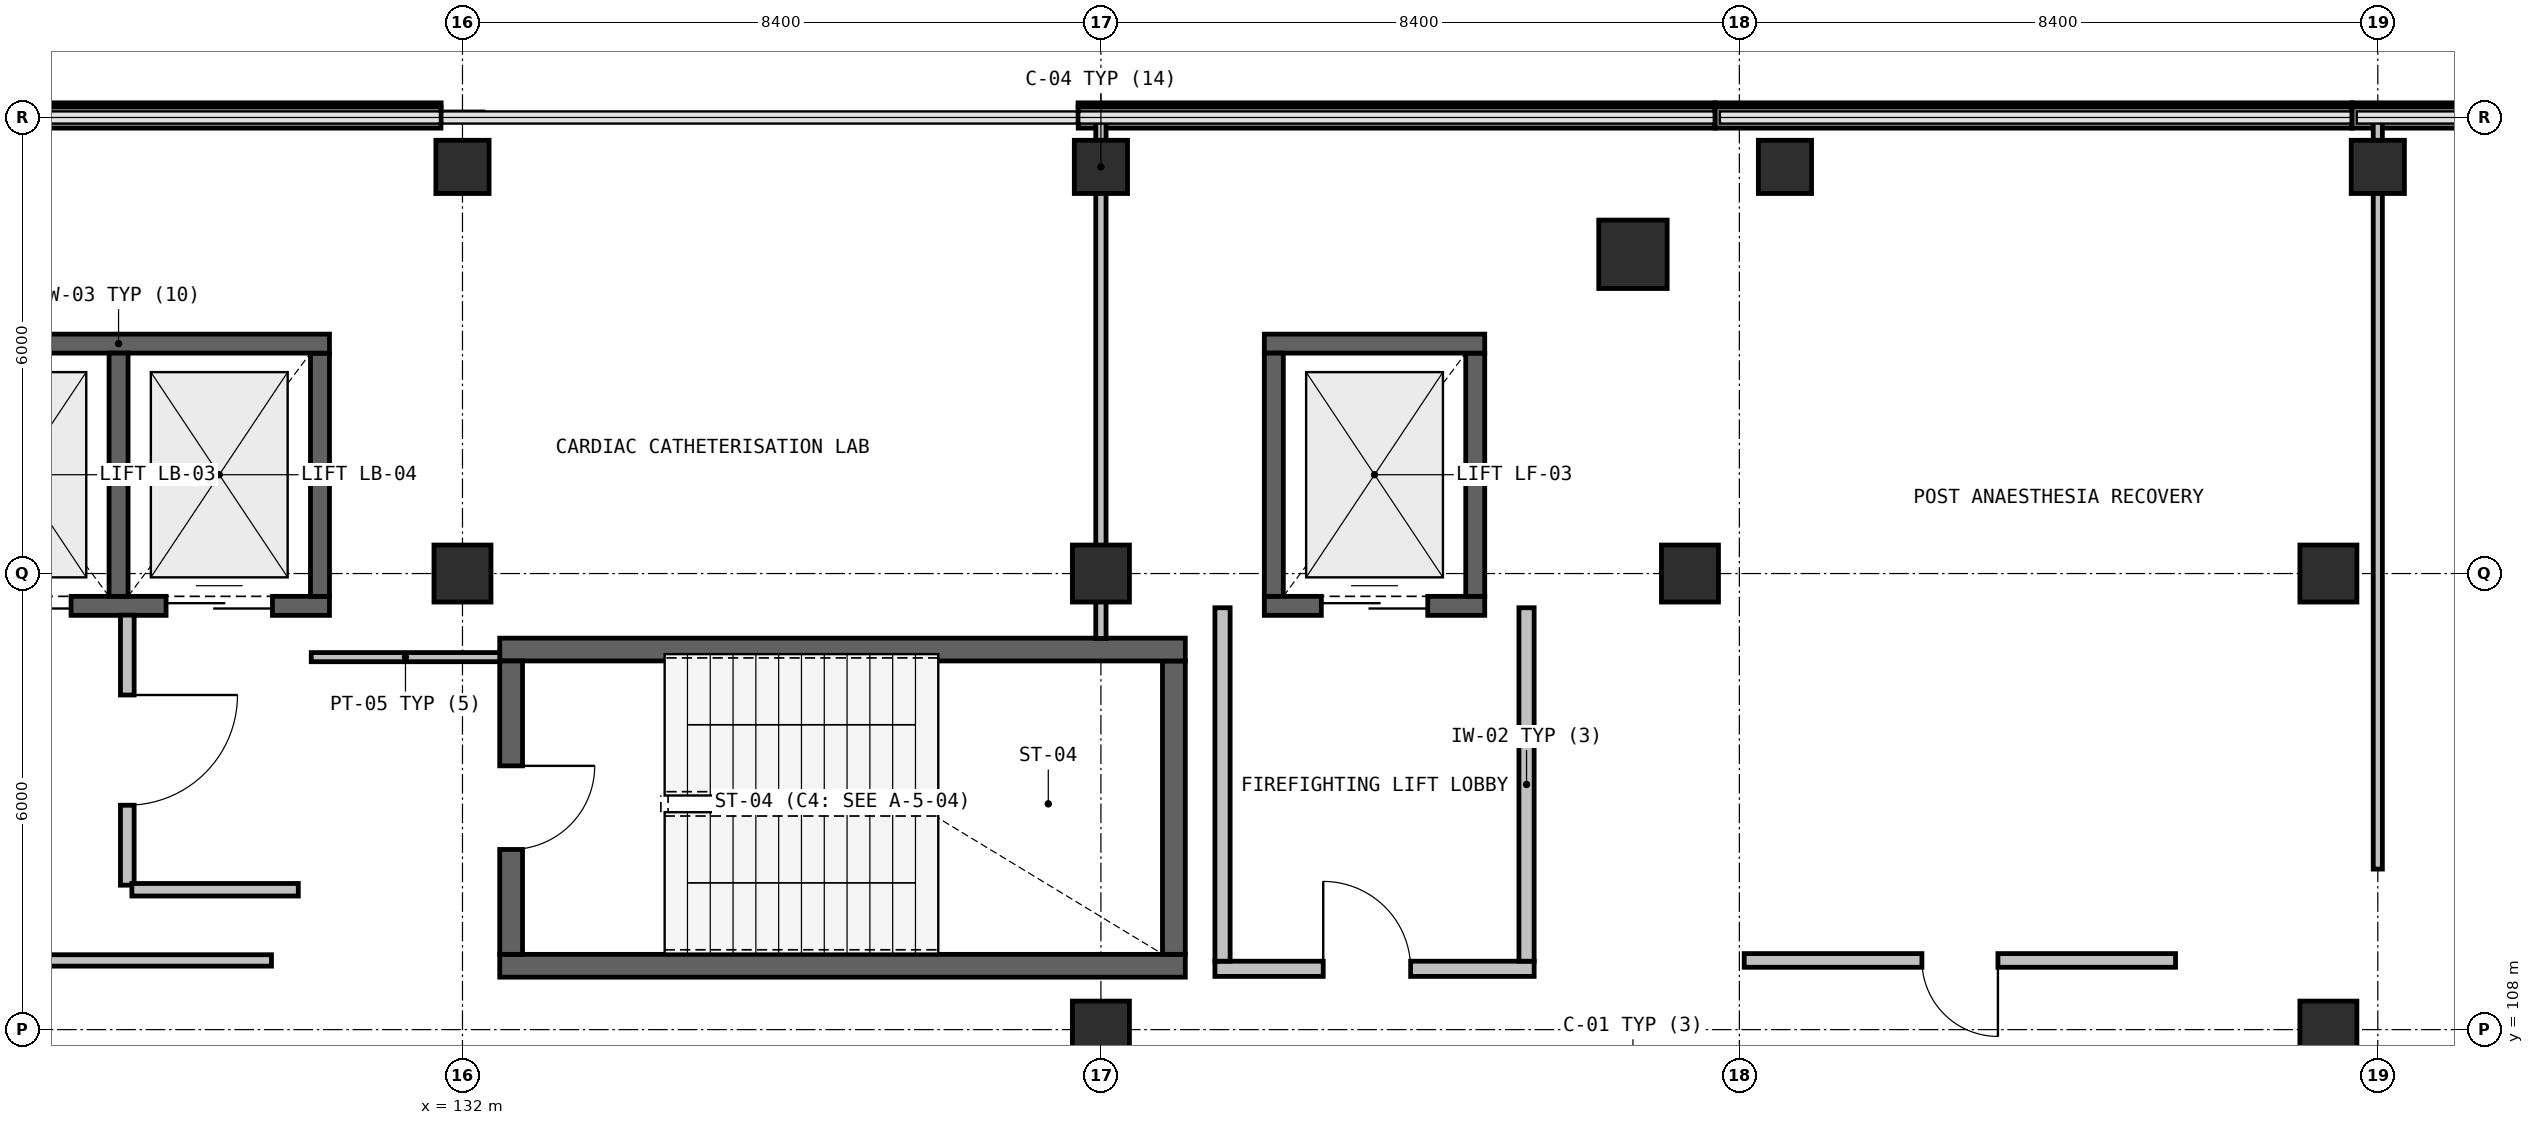
"""IFC4 building model, lengths in metres.
Left out: names, types, materials, properties, quantities, classifications, styles, units other than length and angle.
Written with IfcOpenShell. Run it as: python <this file> out.ifc"""

import sys

from ifc_helpers import new_model, si_unit, direction, frame, frame_2d, origin, origin_2d, place, context, subcontext, project, spatial, rectangle, extrude, element, fill, save


model = new_model("IFC4")
c1 = context("Model", 3, precision=1e-05, world=origin(), true_north=direction((0.0, 1.0)))
c2 = subcontext(c1, "Body", "Model", "MODEL_VIEW")
j1 = project(units=[si_unit("LENGTHUNIT", "METRE"), si_unit("PLANEANGLEUNIT", "RADIAN")], contexts=[c1])
p1 = place(None, origin())
s1 = spatial("IfcSite", under=j1, at=p1, CompositionType="ELEMENT")
p2 = place(p1, origin())
s2 = spatial("IfcBuilding", under=s1, at=p2, CompositionType="ELEMENT")
p3 = place(p2, frame((0.0, 0.0, 10.2)))
s3 = spatial("IfcBuildingStorey", under=s2, at=p3, CompositionType="ELEMENT", Elevation=10.2)
p4 = place(p3, frame((147.4, 118.2, 0.0), z_axis=(0.0, 0.0, 1.0), x_axis=(1.0, 0.0, 0.0)))
e1 = element("IfcColumn", 1, at=p4, inside=s3, PredefinedType="COLUMN", context=c2, shape_type="SweptSolid", body=[
    extrude(rectangle(XDim=0.9, YDim=0.9, at=origin_2d()), origin(), (0.0, 0.0, 1.0), 4.8),
])
for number, where, z_axis, x_axis in (
    (2, (149.4, 119.35, 0.0), (0.0, 0.0, 1.0), (1.0, 0.0, 0.0)),
    (3, (157.2, 119.35, 0.0), (0.0, 0.0, 1.0), (1.0, 0.0, 0.0)),
):
    element("IfcColumn", number, at=place(p3, frame(where, z_axis=z_axis, x_axis=x_axis)), inside=s3, PredefinedType="COLUMN", context=c2, shape_type="SweptSolid", body=[
        extrude(rectangle(XDim=0.7, YDim=0.7, at=origin_2d()), origin(), (0.0, 0.0, 1.0), 4.8),
    ])
p5 = place(p3, frame((132.0, 114.0, 0.0), z_axis=(0.0, 0.0, 1.0), x_axis=(1.0, 0.0, 0.0)))
e4 = element("IfcColumn", 4, at=p5, inside=s3, PredefinedType="COLUMN", context=c2, shape_type="SweptSolid", body=[
    extrude(rectangle(XDim=0.75, YDim=0.75, at=origin_2d()), origin(), (0.0, 0.0, 1.0), 4.8),
])
p6 = place(p3, frame((132.0, 119.35, 0.0), z_axis=(0.0, 0.0, 1.0), x_axis=(1.0, 0.0, 0.0)))
e5 = element("IfcColumn", 5, at=p6, inside=s3, PredefinedType="COLUMN", context=c2, shape_type="SweptSolid", body=[
    extrude(rectangle(XDim=0.7, YDim=0.7, at=origin_2d()), origin(), (0.0, 0.0, 1.0), 4.8),
])
for number, where, z_axis, x_axis in (
    (6, (140.4, 108.0, 0.0), (0.0, 0.0, 1.0), (1.0, 0.0, 0.0)),
    (7, (140.4, 114.0, 0.0), (0.0, 0.0, 1.0), (1.0, 0.0, 0.0)),
):
    element("IfcColumn", number, at=place(p3, frame(where, z_axis=z_axis, x_axis=x_axis)), inside=s3, PredefinedType="COLUMN", context=c2, shape_type="SweptSolid", body=[
        extrude(rectangle(XDim=0.75, YDim=0.75, at=origin_2d()), origin(), (0.0, 0.0, 1.0), 4.8),
    ])
p7 = place(p3, frame((140.4, 119.35, 0.0), z_axis=(0.0, 0.0, 1.0), x_axis=(1.0, 0.0, 0.0)))
e8 = element("IfcColumn", 8, at=p7, inside=s3, PredefinedType="COLUMN", context=c2, shape_type="SweptSolid", body=[
    extrude(rectangle(XDim=0.7, YDim=0.7, at=origin_2d()), origin(), (0.0, 0.0, 1.0), 4.8),
])
for number, where, z_axis, x_axis in (
    (9, (148.15, 114.0, 0.0), (0.0, 0.0, 1.0), (1.0, 0.0, 0.0)),
    (10, (156.55, 108.0, 0.0), (0.0, 0.0, 1.0), (1.0, 0.0, 0.0)),
    (11, (156.55, 114.0, 0.0), (0.0, 0.0, 1.0), (1.0, 0.0, 0.0)),
):
    element("IfcColumn", number, at=place(p3, frame(where, z_axis=z_axis, x_axis=x_axis)), inside=s3, PredefinedType="COLUMN", context=c2, shape_type="SweptSolid", body=[
        extrude(rectangle(XDim=0.75, YDim=0.75, at=origin_2d()), origin(), (0.0, 0.0, 1.0), 4.8),
    ])
for number, where, z_axis, x_axis in (
    (12, (123.341, 120.0, 0.0), (0.0, 0.0, 1.0), (1.0, 0.0, 0.0)),
    (13, (140.101, 120.0, 0.0), (0.0, 0.0, 1.0), (1.0, 0.0, 0.0)),
    (14, (148.481, 120.0, 0.0), (0.0, 0.0, 1.0), (1.0, 0.0, 0.0)),
    (15, (156.861, 120.0, 0.0), (0.0, 0.0, 1.0), (1.0, 0.0, 0.0)),
):
    element("IfcWall", number, at=place(p3, frame(where, z_axis=z_axis, x_axis=x_axis)), inside=s3, PredefinedType="SOLIDWALL", context=c2, shape_type="SweptSolid", body=[
        extrude(rectangle(XDim=8.376, YDim=0.28, at=frame_2d((4.188, 0.0))), origin(), (0.0, 0.0, 1.0), 0.94),
    ])
p8 = place(p3, frame((132.49, 108.84, 0.0), z_axis=(0.0, 0.0, 1.0), x_axis=(1.0, 0.0, 0.0)))
e16 = element("IfcWall", 16, at=p8, inside=s3, PredefinedType="SHEAR", context=c2, shape_type="SweptSolid", body=[
    extrude(rectangle(XDim=9.02, YDim=0.3, at=frame_2d((4.51, 0.0))), origin(), (0.0, 0.0, 1.0), 4.46),
])
p9 = place(p3, frame((141.36, 108.99, 0.0), z_axis=(0.0, 0.0, 1.0), x_axis=(0.0, 1.0, 0.0)))
e17 = element("IfcWall", 17, at=p9, inside=s3, PredefinedType="SHEAR", context=c2, shape_type="SweptSolid", body=[
    extrude(rectangle(XDim=3.86, YDim=0.3, at=frame_2d((1.93, 0.0))), origin(), (0.0, 0.0, 1.0), 4.46),
])
p10 = place(p3, frame((141.51, 113.0, 0.0), z_axis=(0.0, 0.0, 1.0), x_axis=(-1.0, 0.0, 0.0)))
e18 = element("IfcWall", 18, at=p10, inside=s3, PredefinedType="SHEAR", context=c2, shape_type="SweptSolid", body=[
    extrude(rectangle(XDim=9.02, YDim=0.3, at=frame_2d((4.51, 0.0))), origin(), (0.0, 0.0, 1.0), 4.46),
])
p11 = place(p3, frame((132.64, 112.85, 0.0), z_axis=(0.0, 0.0, 1.0), x_axis=(0.0, -1.0, 0.0)))
e19 = element("IfcWall", 19, at=p11, inside=s3, PredefinedType="SHEAR", context=c2, shape_type="SweptSolid", body=[
    extrude(rectangle(XDim=3.86, YDim=0.3, at=frame_2d((1.93, 0.0))), origin(), (0.0, 0.0, 1.0), 4.46),
])
p12 = place(p11, frame((1.38, 0.0, 0.0)))
e20 = element("IfcOpeningElement", 20, at=p12, cuts=e19, PredefinedType="OPENING", context=c2, shape_type="SweptSolid", body=[
    extrude(rectangle(XDim=1.1, YDim=2.15, at=frame_2d((0.55, 1.075))), frame((0.0, 0.16, 0.0), z_axis=(0.0, -1.0, 0.0), x_axis=(1.0, 0.0, 0.0)), (0.0, 0.0, 1.0), 0.32),
])
p13 = place(p3, frame((141.9, 108.8, 0.0), z_axis=(0.0, 0.0, 1.0), x_axis=(1.0, 0.0, 0.0)))
e21 = element("IfcWall", 21, at=p13, inside=s3, PredefinedType="SOLIDWALL", context=c2, shape_type="SweptSolid", body=[
    extrude(rectangle(XDim=4.2, YDim=0.2, at=frame_2d((2.1, 0.0))), origin(), (0.0, 0.0, 1.0), 4.46),
])
p14 = place(p13, frame((1.425, 0.0, 0.0)))
e22 = element("IfcOpeningElement", 22, at=p14, cuts=e21, PredefinedType="OPENING", context=c2, shape_type="SweptSolid", body=[
    extrude(rectangle(XDim=1.15, YDim=2.15, at=frame_2d((0.575, 1.075))), frame((0.0, 0.11, 0.0), z_axis=(0.0, -1.0, 0.0), x_axis=(1.0, 0.0, 0.0)), (0.0, 0.0, 1.0), 0.22),
])
for number, where, z_axis, x_axis in (
    (23, (146.0, 108.9, 0.0), (0.0, 0.0, 1.0), (0.0, 1.0, 0.0)),
    (24, (142.0, 113.55, 0.0), (0.0, 0.0, 1.0), (0.0, -1.0, 0.0)),
):
    element("IfcWall", number, at=place(p3, frame(where, z_axis=z_axis, x_axis=x_axis)), inside=s3, PredefinedType="SOLIDWALL", context=c2, shape_type="SweptSolid", body=[
        extrude(rectangle(XDim=4.65, YDim=0.2, at=frame_2d((2.325, 0.0))), origin(), (0.0, 0.0, 1.0), 4.46),
    ])
p15 = place(p3, frame((124.7, 113.575, 0.0), z_axis=(0.0, 0.0, 1.0), x_axis=(1.0, 0.0, 0.0)))
e25 = element("IfcWall", 25, at=p15, inside=s3, PredefinedType="SHEAR", context=c2, shape_type="SweptSolid", body=[
    extrude(rectangle(XDim=5.55, YDim=0.25, at=frame_2d((2.775, 0.0))), origin(), (0.0, 0.0, 1.0), 4.46),
])
p16 = place(p15, frame((0.75, 0.0, 0.0)))
e26 = element("IfcOpeningElement", 26, at=p16, cuts=e25, PredefinedType="OPENING", context=c2, shape_type="SweptSolid", body=[
    extrude(rectangle(XDim=1.4, YDim=2.2, at=frame_2d((0.7, 1.1))), frame((0.0, 0.135, 0.0), z_axis=(0.0, -1.0, 0.0), x_axis=(1.0, 0.0, 0.0)), (0.0, 0.0, 1.0), 0.27),
])
p17 = place(p15, frame((3.4, 0.0, 0.0)))
e27 = element("IfcOpeningElement", 27, at=p17, cuts=e25, PredefinedType="OPENING", context=c2, shape_type="SweptSolid", body=[
    extrude(rectangle(XDim=1.4, YDim=2.2, at=frame_2d((0.7, 1.1))), frame((0.0, 0.135, 0.0), z_axis=(0.0, -1.0, 0.0), x_axis=(1.0, 0.0, 0.0)), (0.0, 0.0, 1.0), 0.27),
])
p18 = place(p3, frame((130.125, 113.7, 0.0), z_axis=(0.0, 0.0, 1.0), x_axis=(0.0, 1.0, 0.0)))
e28 = element("IfcWall", 28, at=p18, inside=s3, PredefinedType="SHEAR", context=c2, shape_type="SweptSolid", body=[
    extrude(rectangle(XDim=3.2, YDim=0.25, at=frame_2d((1.6, 0.0))), origin(), (0.0, 0.0, 1.0), 4.46),
])
p19 = place(p3, frame((130.25, 117.025, 0.0), z_axis=(0.0, 0.0, 1.0), x_axis=(-1.0, 0.0, 0.0)))
e29 = element("IfcWall", 29, at=p19, inside=s3, PredefinedType="SHEAR", context=c2, shape_type="SweptSolid", body=[
    extrude(rectangle(XDim=5.55, YDim=0.25, at=frame_2d((2.775, 0.0))), origin(), (0.0, 0.0, 1.0), 4.46),
])
p20 = place(p3, frame((127.475, 113.7, 0.0), z_axis=(0.0, 0.0, 1.0), x_axis=(0.0, 1.0, 0.0)))
e30 = element("IfcWall", 30, at=p20, inside=s3, PredefinedType="SHEAR", context=c2, shape_type="SweptSolid", body=[
    extrude(rectangle(XDim=3.2, YDim=0.25, at=frame_2d((1.6, 0.0))), origin(), (0.0, 0.0, 1.0), 4.46),
])
p21 = place(p3, frame((142.55, 113.575, 0.0), z_axis=(0.0, 0.0, 1.0), x_axis=(1.0, 0.0, 0.0)))
e31 = element("IfcWall", 31, at=p21, inside=s3, PredefinedType="SHEAR", context=c2, shape_type="SweptSolid", body=[
    extrude(rectangle(XDim=2.9, YDim=0.25, at=frame_2d((1.45, 0.0))), origin(), (0.0, 0.0, 1.0), 4.46),
])
p22 = place(p21, frame((0.75, 0.0, 0.0)))
e32 = element("IfcOpeningElement", 32, at=p22, cuts=e31, PredefinedType="OPENING", context=c2, shape_type="SweptSolid", body=[
    extrude(rectangle(XDim=1.4, YDim=2.15, at=frame_2d((0.7, 1.075))), frame((0.0, 0.135, 0.0), z_axis=(0.0, -1.0, 0.0), x_axis=(1.0, 0.0, 0.0)), (0.0, 0.0, 1.0), 0.27),
])
p23 = place(p3, frame((145.325, 113.7, 0.0), z_axis=(0.0, 0.0, 1.0), x_axis=(0.0, 1.0, 0.0)))
e33 = element("IfcWall", 33, at=p23, inside=s3, PredefinedType="SHEAR", context=c2, shape_type="SweptSolid", body=[
    extrude(rectangle(XDim=3.2, YDim=0.25, at=frame_2d((1.6, 0.0))), origin(), (0.0, 0.0, 1.0), 4.46),
])
p24 = place(p3, frame((145.45, 117.025, 0.0), z_axis=(0.0, 0.0, 1.0), x_axis=(-1.0, 0.0, 0.0)))
e34 = element("IfcWall", 34, at=p24, inside=s3, PredefinedType="SHEAR", context=c2, shape_type="SweptSolid", body=[
    extrude(rectangle(XDim=2.9, YDim=0.25, at=frame_2d((1.45, 0.0))), origin(), (0.0, 0.0, 1.0), 4.46),
])
p25 = place(p3, frame((142.675, 116.9, 0.0), z_axis=(0.0, 0.0, 1.0), x_axis=(0.0, -1.0, 0.0)))
e35 = element("IfcWall", 35, at=p25, inside=s3, PredefinedType="SHEAR", context=c2, shape_type="SweptSolid", body=[
    extrude(rectangle(XDim=3.2, YDim=0.25, at=frame_2d((1.6, 0.0))), origin(), (0.0, 0.0, 1.0), 4.46),
])
p26 = place(p3, frame((140.4, 119.958, 0.0), z_axis=(0.0, 0.0, 1.0), x_axis=(0.0, -1.0, 0.0)))
e36 = element("IfcWall", 36, at=p26, inside=s3, PredefinedType="PARTITIONING", context=c2, shape_type="SweptSolid", body=[
    extrude(rectangle(XDim=6.811, YDim=0.135, at=frame_2d((3.406, 0.0))), origin(), (0.0, 0.0, 1.0), 3.81),
])
p27 = place(p3, frame((132.49, 112.9, 0.0), z_axis=(0.0, 0.0, 1.0), x_axis=(-1.0, 0.0, 0.0)))
e37 = element("IfcWall", 37, at=p27, inside=s3, PredefinedType="PARTITIONING", context=c2, shape_type="SweptSolid", body=[
    extrude(rectangle(XDim=2.48, YDim=0.12, at=frame_2d((1.24, 0.0))), origin(), (0.0, 0.0, 1.0), 4.46),
])
p28 = place(p3, frame((127.59, 113.453, 0.0), z_axis=(0.0, 0.0, 1.0), x_axis=(0.0, -1.0, 0.0)))
e38 = element("IfcWall", 38, at=p28, inside=s3, PredefinedType="PARTITIONING", context=c2, shape_type="SweptSolid", body=[
    extrude(rectangle(XDim=3.553, YDim=0.18, at=frame_2d((1.776, 0.0))), origin(), (0.0, 0.0, 1.0), 4.46),
])
p29 = place(p28, frame((1.051, 0.0, 0.0)))
e39 = element("IfcOpeningElement", 39, at=p29, cuts=e38, PredefinedType="OPENING", context=c2, shape_type="SweptSolid", body=[
    extrude(rectangle(XDim=1.45, YDim=2.15, at=frame_2d((0.725, 1.075))), frame((0.0, 0.1, 0.0), z_axis=(0.0, -1.0, 0.0), x_axis=(1.0, 0.0, 0.0)), (0.0, 0.0, 1.0), 0.2),
])
p30 = place(p3, frame((127.65, 109.84, 0.0), z_axis=(0.0, 0.0, 1.0), x_axis=(1.0, 0.0, 0.0)))
e40 = element("IfcWall", 40, at=p30, inside=s3, PredefinedType="PARTITIONING", context=c2, shape_type="SweptSolid", body=[
    extrude(rectangle(XDim=2.19, YDim=0.165, at=frame_2d((1.095, 0.0))), origin(), (0.0, 0.0, 1.0), 4.46),
])
p31 = place(p3, frame((129.487, 108.91, 0.0), z_axis=(0.0, 0.0, 1.0), x_axis=(-1.0, 0.0, 0.0)))
e41 = element("IfcWall", 41, at=p31, inside=s3, PredefinedType="PARTITIONING", context=c2, shape_type="SweptSolid", body=[
    extrude(rectangle(XDim=3.876, YDim=0.15, at=frame_2d((1.938, 0.0))), origin(), (0.0, 0.0, 1.0), 4.46),
])
p32 = place(p3, frame((157.2, 119.958, 0.0), z_axis=(0.0, 0.0, 1.0), x_axis=(0.0, -1.0, 0.0)))
e42 = element("IfcWall", 42, at=p32, inside=s3, PredefinedType="PARTITIONING", context=c2, shape_type="SweptSolid", body=[
    extrude(rectangle(XDim=9.846, YDim=0.12, at=frame_2d((4.923, 0.0))), origin(), (0.0, 0.0, 1.0), 4.46),
])
p33 = place(p3, frame((154.539, 108.91, 0.0), z_axis=(0.0, 0.0, 1.0), x_axis=(-1.0, 0.0, 0.0)))
e43 = element("IfcWall", 43, at=p33, inside=s3, PredefinedType="PARTITIONING", context=c2, shape_type="SweptSolid", body=[
    extrude(rectangle(XDim=5.675, YDim=0.18, at=frame_2d((2.837, 0.0))), origin(), (0.0, 0.0, 1.0), 4.46),
])
p34 = place(p33, frame((2.337, 0.0, 0.0)))
e44 = element("IfcOpeningElement", 44, at=p34, cuts=e43, PredefinedType="OPENING", context=c2, shape_type="SweptSolid", body=[
    extrude(rectangle(XDim=1.0, YDim=2.15, at=frame_2d((0.5, 1.075))), frame((0.0, 0.1, 0.0), z_axis=(0.0, -1.0, 0.0), x_axis=(1.0, 0.0, 0.0)), (0.0, 0.0, 1.0), 0.2),
])
p35 = place(p12, origin())
e45 = element("IfcDoor", 45, at=p35, inside=s3, OperationType="SINGLE_SWING_LEFT", PredefinedType="DOOR", context=c2, shape_type="SweptSolid", body=[
    extrude(rectangle(XDim=1.1, YDim=2.15, at=frame_2d((0.55, 1.075))), frame((0.0, 0.025, 0.0), z_axis=(0.0, -1.0, 0.0), x_axis=(1.0, 0.0, 0.0)), (0.0, 0.0, 1.0), 0.05),
])
fill(e20, e45)
p36 = place(p14, origin())
e46 = element("IfcDoor", 46, at=p36, inside=s3, OperationType="SINGLE_SWING_RIGHT", PredefinedType="DOOR", context=c2, shape_type="SweptSolid", body=[
    extrude(rectangle(XDim=1.15, YDim=2.15, at=frame_2d((0.575, 1.075))), frame((0.0, 0.025, 0.0), z_axis=(0.0, -1.0, 0.0), x_axis=(1.0, 0.0, 0.0)), (0.0, 0.0, 1.0), 0.05),
])
fill(e22, e46)
p37 = place(p16, origin())
e47 = element("IfcDoor", 47, at=p37, inside=s3, OperationType="DOUBLE_DOOR_SLIDING", PredefinedType="DOOR", context=c2, shape_type="SweptSolid", body=[
    extrude(rectangle(XDim=1.4, YDim=2.2, at=frame_2d((0.7, 1.1))), frame((0.0, 0.025, 0.0), z_axis=(0.0, -1.0, 0.0), x_axis=(1.0, 0.0, 0.0)), (0.0, 0.0, 1.0), 0.05),
])
fill(e26, e47)
p38 = place(p17, origin())
e48 = element("IfcDoor", 48, at=p38, inside=s3, OperationType="DOUBLE_DOOR_SLIDING", PredefinedType="DOOR", context=c2, shape_type="SweptSolid", body=[
    extrude(rectangle(XDim=1.4, YDim=2.2, at=frame_2d((0.7, 1.1))), frame((0.0, 0.025, 0.0), z_axis=(0.0, -1.0, 0.0), x_axis=(1.0, 0.0, 0.0)), (0.0, 0.0, 1.0), 0.05),
])
fill(e27, e48)
p39 = place(p22, origin())
e49 = element("IfcDoor", 49, at=p39, inside=s3, OperationType="DOUBLE_DOOR_SLIDING", PredefinedType="DOOR", context=c2, shape_type="SweptSolid", body=[
    extrude(rectangle(XDim=1.4, YDim=2.15, at=frame_2d((0.7, 1.075))), frame((0.0, 0.025, 0.0), z_axis=(0.0, -1.0, 0.0), x_axis=(1.0, 0.0, 0.0)), (0.0, 0.0, 1.0), 0.05),
])
fill(e32, e49)
p40 = place(p29, origin())
e50 = element("IfcDoor", 50, at=p40, inside=s3, OperationType="SINGLE_SWING_LEFT", PredefinedType="DOOR", context=c2, shape_type="SweptSolid", body=[
    extrude(rectangle(XDim=1.45, YDim=2.15, at=frame_2d((0.725, 1.075))), frame((0.0, 0.025, 0.0), z_axis=(0.0, -1.0, 0.0), x_axis=(1.0, 0.0, 0.0)), (0.0, 0.0, 1.0), 0.05),
])
fill(e39, e50)
p41 = place(p34, origin())
e51 = element("IfcDoor", 51, at=p41, inside=s3, OperationType="SINGLE_SWING_RIGHT", PredefinedType="DOOR", context=c2, shape_type="SweptSolid", body=[
    extrude(rectangle(XDim=1.0, YDim=2.15, at=frame_2d((0.5, 1.075))), frame((0.0, 0.025, 0.0), z_axis=(0.0, -1.0, 0.0), x_axis=(1.0, 0.0, 0.0)), (0.0, 0.0, 1.0), 0.05),
])
fill(e44, e51)
save(model, sys.argv[1])
